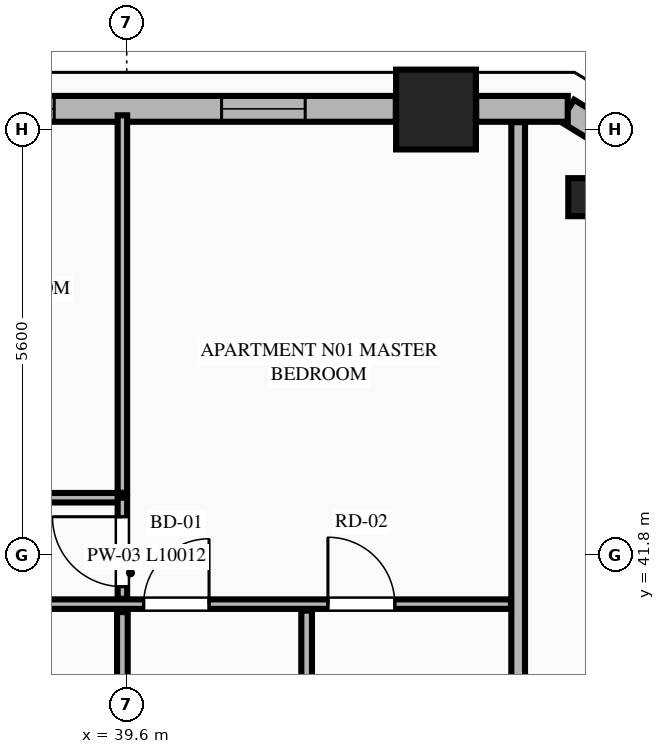
"""IFC4 building model, lengths in metres.
Left out: names, types, materials, properties, quantities, classifications, styles, units other than length and angle.
Written with IfcOpenShell. Run it as: python <this file> out.ifc"""

import sys

from ifc_helpers import new_model, si_unit, direction, frame, frame_2d, origin, origin_2d, place, context, subcontext, project, spatial, rectangle, extrude, element, fill, save


model = new_model("IFC4")
c1 = context("Model", 3, precision=1e-05, world=origin(), true_north=direction((0.0, 1.0)))
c2 = subcontext(c1, "Body", "Model", "MODEL_VIEW")
j1 = project(units=[si_unit("LENGTHUNIT", "METRE"), si_unit("PLANEANGLEUNIT", "RADIAN")], contexts=[c1])
p1 = place(None, origin())
s1 = spatial("IfcSite", under=j1, at=p1, CompositionType="ELEMENT")
p2 = place(p1, origin())
s2 = spatial("IfcBuilding", under=s1, at=p2, CompositionType="ELEMENT")
p3 = place(p2, frame((0.0, 0.0, 126.8)))
s3 = spatial("IfcBuildingStorey", under=s2, at=p3, CompositionType="ELEMENT", Elevation=126.8)
p4 = place(p3, frame((43.669, 47.661, 0.0), z_axis=(0.0, 0.0, 1.0), x_axis=(1.0, 0.0, 0.0)))
e1 = element("IfcColumn", 1, at=p4, inside=s3, PredefinedType="COLUMN", context=c2, shape_type="SweptSolid", body=[
    extrude(rectangle(XDim=1.05, YDim=1.05, at=origin_2d()), origin(), (0.0, 0.0, 1.0), 3.55),
])
p5 = place(p3, frame((45.659, 46.508, 0.0), z_axis=(0.0, 0.0, 1.0), x_axis=(-0.865160173452, 0.501495637342, 0.0)))
e2 = element("IfcColumn", 2, at=p5, inside=s3, PredefinedType="PILASTER", context=c2, shape_type="SweptSolid", body=[
    extrude(rectangle(XDim=0.5, YDim=0.35, at=origin_2d()), origin(), (0.0, 0.0, 1.0), 3.55),
])
p6 = place(p3, frame((46.971, 46.677, 0.0), z_axis=(0.0, 0.0, 1.0), x_axis=(-0.851798915137, 0.523868884523, 0.0)))
e3 = element("IfcWall", 3, at=p6, inside=s3, PredefinedType="STANDARD", context=c2, shape_type="SweptSolid", body=[
    extrude(rectangle(XDim=1.848, YDim=0.34, at=frame_2d((0.924, 0.0))), origin(), (0.0, 0.0, 1.0), 3.34),
])
p7 = place(p3, frame((45.402, 47.67, 0.0), z_axis=(0.0, 0.0, 1.0), x_axis=(-1.0, 0.0, 0.0)))
e4 = element("IfcWall", 4, at=p7, inside=s3, PredefinedType="STANDARD", context=c2, shape_type="SweptSolid", body=[
    extrude(rectangle(XDim=1.204, YDim=0.34, at=frame_2d((0.602, 0.0))), origin(), (0.0, 0.0, 1.0), 3.34),
])
p8 = place(p3, frame((43.14, 47.67, 0.0), z_axis=(0.0, 0.0, 1.0), x_axis=(-1.0, 0.0, 0.0)))
e5 = element("IfcWall", 5, at=p8, inside=s3, PredefinedType="STANDARD", context=c2, shape_type="SweptSolid", body=[
    extrude(rectangle(XDim=6.379, YDim=0.34, at=frame_2d((3.189, 0.0))), origin(), (0.0, 0.0, 1.0), 2.797),
])
p9 = place(p8, frame((1.192, 0.0, 0.75)))
e6 = element("IfcOpeningElement", 6, at=p9, cuts=e5, PredefinedType="OPENING", context=c2, shape_type="SweptSolid", body=[
    extrude(rectangle(XDim=1.1, YDim=1.897, at=frame_2d((0.55, 0.948))), frame((0.0, 0.18, 0.0), z_axis=(0.0, -1.0, 0.0), x_axis=(1.0, 0.0, 0.0)), (0.0, 0.0, 1.0), 0.36),
])
p10 = place(p8, frame((4.494, 0.0, 0.75)))
e7 = element("IfcOpeningElement", 7, at=p10, cuts=e5, PredefinedType="OPENING", context=c2, shape_type="SweptSolid", body=[
    extrude(rectangle(XDim=1.1, YDim=1.897, at=frame_2d((0.55, 0.948))), frame((0.0, 0.18, 0.0), z_axis=(0.0, -1.0, 0.0), x_axis=(1.0, 0.0, 0.0)), (0.0, 0.0, 1.0), 0.36),
])
p11 = place(p3, frame((44.75, 35.3, 0.0), z_axis=(0.0, 0.0, 1.0), x_axis=(0.0, 1.0, 0.0)))
e8 = element("IfcWall", 8, at=p11, inside=s3, PredefinedType="PARTITIONING", context=c2, shape_type="SweptSolid", body=[
    extrude(rectangle(XDim=12.195, YDim=0.18, at=frame_2d((6.098, 0.0))), origin(), (0.0, 0.0, 1.0), 3.34),
])
p12 = place(p3, frame((34.643, 41.154, 0.0), z_axis=(0.0, 0.0, 1.0), x_axis=(1.0, 0.0, 0.0)))
e9 = element("IfcWall", 9, at=p12, inside=s3, PredefinedType="PARTITIONING", context=c2, shape_type="SweptSolid", body=[
    extrude(rectangle(XDim=10.012, YDim=0.125, at=frame_2d((5.006, 0.0))), origin(), (0.0, 0.0, 1.0), 3.34),
])
p13 = place(p12, frame((5.18, 0.0, 0.0)))
e10 = element("IfcOpeningElement", 10, at=p13, cuts=e9, PredefinedType="OPENING", context=c2, shape_type="SweptSolid", body=[
    extrude(rectangle(XDim=0.86, YDim=2.1, at=frame_2d((0.43, 1.05))), frame((0.0, 0.073, 0.0), z_axis=(0.0, -1.0, 0.0), x_axis=(1.0, 0.0, 0.0)), (0.0, 0.0, 1.0), 0.145),
])
p14 = place(p12, frame((7.604, 0.0, 0.0)))
e11 = element("IfcOpeningElement", 11, at=p14, cuts=e9, PredefinedType="OPENING", context=c2, shape_type="SweptSolid", body=[
    extrude(rectangle(XDim=0.88, YDim=2.15, at=frame_2d((0.44, 1.075))), frame((0.0, 0.073, 0.0), z_axis=(0.0, -1.0, 0.0), x_axis=(1.0, 0.0, 0.0)), (0.0, 0.0, 1.0), 0.145),
])
p15 = place(p12, frame((0.3, 0.0, 0.0)))
e12 = element("IfcOpeningElement", 12, at=p15, cuts=e9, PredefinedType="OPENING", context=c2, shape_type="SweptSolid", body=[
    extrude(rectangle(XDim=0.88, YDim=2.15, at=frame_2d((0.44, 1.075))), frame((0.0, 0.073, 0.0), z_axis=(0.0, -1.0, 0.0), x_axis=(1.0, 0.0, 0.0)), (0.0, 0.0, 1.0), 0.145),
])
p16 = place(p3, frame((29.436, 42.554, 0.0), z_axis=(0.0, 0.0, 1.0), x_axis=(1.0, 0.0, 0.0)))
e13 = element("IfcWall", 13, at=p16, inside=s3, PredefinedType="PARTITIONING", context=c2, shape_type="SweptSolid", body=[
    extrude(rectangle(XDim=10.107, YDim=0.125, at=frame_2d((5.053, 0.0))), origin(), (0.0, 0.0, 1.0), 2.975),
])
p17 = place(p16, frame((0.35, 0.0, 0.0)))
e14 = element("IfcOpeningElement", 14, at=p17, cuts=e13, PredefinedType="OPENING", context=c2, shape_type="SweptSolid", body=[
    extrude(rectangle(XDim=0.92, YDim=2.15, at=frame_2d((0.46, 1.075))), frame((0.0, 0.073, 0.0), z_axis=(0.0, -1.0, 0.0), x_axis=(1.0, 0.0, 0.0)), (0.0, 0.0, 1.0), 0.145),
])
p18 = place(p16, frame((5.557, 0.0, 0.0)))
e15 = element("IfcOpeningElement", 15, at=p18, cuts=e13, PredefinedType="OPENING", context=c2, shape_type="SweptSolid", body=[
    extrude(rectangle(XDim=0.92, YDim=2.15, at=frame_2d((0.46, 1.075))), frame((0.0, 0.073, 0.0), z_axis=(0.0, -1.0, 0.0), x_axis=(1.0, 0.0, 0.0)), (0.0, 0.0, 1.0), 0.145),
])
p19 = place(p3, frame((39.543, 41.224, 0.0), z_axis=(0.0, 0.0, 1.0), x_axis=(0.0, 1.0, 0.0)))
e16 = element("IfcWall", 16, at=p19, inside=s3, PredefinedType="PARTITIONING", context=c2, shape_type="SweptSolid", body=[
    extrude(rectangle(XDim=1.33, YDim=0.125, at=frame_2d((0.665, 0.0))), origin(), (0.0, 0.0, 1.0), 3.34),
])
p20 = place(p19, frame((0.16, 0.0, 0.0)))
e17 = element("IfcOpeningElement", 17, at=p20, cuts=e16, PredefinedType="OPENING", context=c2, shape_type="SweptSolid", body=[
    extrude(rectangle(XDim=0.92, YDim=2.15, at=frame_2d((0.46, 1.075))), frame((0.0, 0.073, 0.0), z_axis=(0.0, -1.0, 0.0), x_axis=(1.0, 0.0, 0.0)), (0.0, 0.0, 1.0), 0.145),
])
p21 = place(p3, frame((39.543, 42.619, 0.0), z_axis=(0.0, 0.0, 1.0), x_axis=(0.0, 1.0, 0.0)))
e18 = element("IfcWall", 18, at=p21, inside=s3, PredefinedType="PARTITIONING", context=c2, shape_type="SweptSolid", body=[
    extrude(rectangle(XDim=4.966, YDim=0.125, at=frame_2d((2.483, 0.0))), origin(), (0.0, 0.0, 1.0), 3.34),
])
p22 = place(p3, frame((39.543, 35.385, 0.0), z_axis=(0.0, 0.0, 1.0), x_axis=(0.0, 1.0, 0.0)))
e19 = element("IfcWall", 19, at=p22, inside=s3, PredefinedType="PLUMBINGWALL", context=c2, shape_type="SweptSolid", body=[
    extrude(rectangle(XDim=5.664, YDim=0.14, at=frame_2d((2.832, 0.0))), origin(), (0.0, 0.0, 1.0), 3.34),
])
p23 = place(p3, frame((41.967, 35.385, 0.0), z_axis=(0.0, 0.0, 1.0), x_axis=(0.0, 1.0, 0.0)))
e20 = element("IfcWall", 20, at=p23, inside=s3, PredefinedType="PLUMBINGWALL", context=c2, shape_type="SweptSolid", body=[
    extrude(rectangle(XDim=5.684, YDim=0.14, at=frame_2d((2.842, 0.0))), origin(), (0.0, 0.0, 1.0), 2.722),
])
p24 = place(p9, origin())
e21 = element("IfcWindow", 21, at=p24, inside=s3, PartitioningType="SINGLE_PANEL", PredefinedType="WINDOW", context=c2, shape_type="SweptSolid", body=[
    extrude(rectangle(XDim=1.1, YDim=1.897, at=frame_2d((0.55, 0.948))), frame((0.0, 0.03, 0.0), z_axis=(0.0, -1.0, 0.0), x_axis=(1.0, 0.0, 0.0)), (0.0, 0.0, 1.0), 0.06),
])
fill(e6, e21)
p25 = place(p13, origin())
e22 = element("IfcDoor", 22, at=p25, inside=s3, OperationType="SINGLE_SWING_RIGHT", PredefinedType="DOOR", context=c2, shape_type="SweptSolid", body=[
    extrude(rectangle(XDim=0.86, YDim=2.1, at=frame_2d((0.43, 1.05))), frame((0.0, 0.025, 0.0), z_axis=(0.0, -1.0, 0.0), x_axis=(1.0, 0.0, 0.0)), (0.0, 0.0, 1.0), 0.05),
])
fill(e10, e22)
p26 = place(p14, origin())
e23 = element("IfcDoor", 23, at=p26, inside=s3, OperationType="SINGLE_SWING_LEFT", PredefinedType="DOOR", context=c2, shape_type="SweptSolid", body=[
    extrude(rectangle(XDim=0.88, YDim=2.15, at=frame_2d((0.44, 1.075))), frame((0.0, 0.025, 0.0), z_axis=(0.0, -1.0, 0.0), x_axis=(1.0, 0.0, 0.0)), (0.0, 0.0, 1.0), 0.05),
])
fill(e11, e23)
p27 = place(p20, origin())
e24 = element("IfcDoor", 24, at=p27, inside=s3, OperationType="SINGLE_SWING_RIGHT", PredefinedType="DOOR", context=c2, shape_type="SweptSolid", body=[
    extrude(rectangle(XDim=0.92, YDim=2.15, at=frame_2d((0.46, 1.075))), frame((0.0, 0.025, 0.0), z_axis=(0.0, -1.0, 0.0), x_axis=(1.0, 0.0, 0.0)), (0.0, 0.0, 1.0), 0.05),
])
fill(e17, e24)
p28 = place(p10, origin())
e25 = element("IfcWindow", 25, at=p28, inside=s3, PartitioningType="SINGLE_PANEL", PredefinedType="WINDOW", context=c2, shape_type="SweptSolid", body=[
    extrude(rectangle(XDim=1.1, YDim=1.897, at=frame_2d((0.55, 0.948))), frame((0.0, 0.03, 0.0), z_axis=(0.0, -1.0, 0.0), x_axis=(1.0, 0.0, 0.0)), (0.0, 0.0, 1.0), 0.06),
])
fill(e7, e25)
save(model, sys.argv[1])
